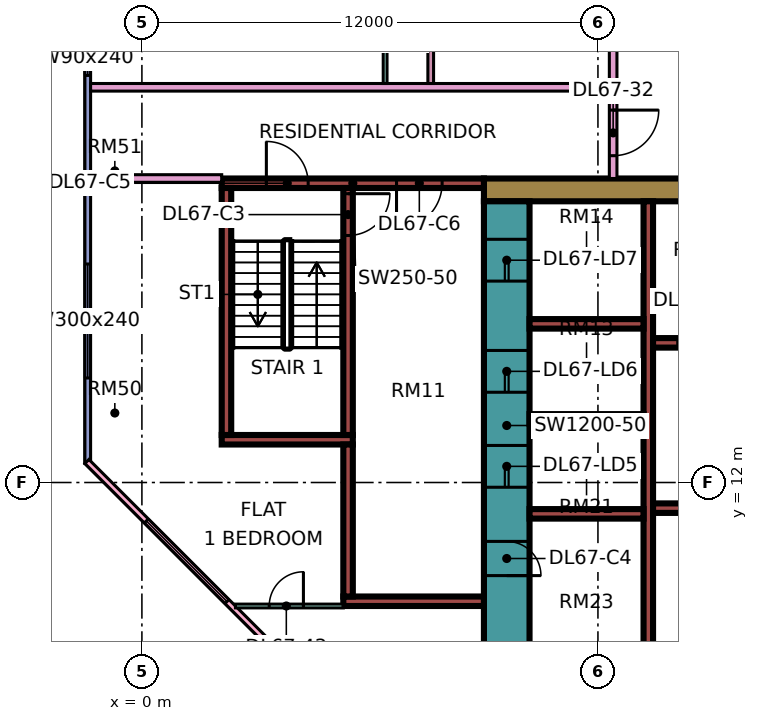
"""IFC4 building model, lengths in metres.
Left out: names, types, materials, properties, quantities, classifications, styles, units other than length and angle.
Written with IfcOpenShell. Run it as: python <this file> out.ifc"""

import sys

from ifc_helpers import new_model, si_unit, direction, frame, frame_2d, origin, place, context, subcontext, project, spatial, rectangle, extrude, element, fill, save


model = new_model("IFC4")
c1 = context("Model", 3, precision=1e-05, world=origin(), true_north=direction((0.0, 1.0)))
c2 = subcontext(c1, "Body", "Model", "MODEL_VIEW")
j1 = project(units=[si_unit("LENGTHUNIT", "METRE"), si_unit("PLANEANGLEUNIT", "RADIAN")], contexts=[c1])
p1 = place(None, origin())
s1 = spatial("IfcSite", under=j1, at=p1, CompositionType="ELEMENT")
p2 = place(p1, origin())
s2 = spatial("IfcBuilding", under=s1, at=p2, CompositionType="ELEMENT")
p3 = place(p2, frame((0.0, 0.0, 288.4)))
s3 = spatial("IfcBuildingStorey", under=s2, at=p3, CompositionType="ELEMENT", Elevation=288.4)
p4 = place(p3, frame((9.0, 19.7, 0.0), z_axis=(0.0, 0.0, 1.0), x_axis=(1.0, 0.0, 0.0)))
e1 = element("IfcWall", 1, at=p4, inside=s3, PredefinedType="SHEAR", context=c2, shape_type="SweptSolid", body=[
    extrude(rectangle(XDim=25.0, YDim=0.6, at=frame_2d((12.5, 0.0))), origin(), (0.0, 0.0, 1.0), 3.75),
])
p5 = place(p4, frame((19.1, 0.0, 0.0)))
e2 = element("IfcOpeningElement", 2, at=p5, cuts=e1, PredefinedType="OPENING", context=c2, shape_type="SweptSolid", body=[
    extrude(rectangle(XDim=1.8, YDim=2.4, at=frame_2d((0.9, 1.2))), frame((0.0, 0.31, 0.0), z_axis=(0.0, -1.0, 0.0), x_axis=(1.0, 0.0, 0.0)), (0.0, 0.0, 1.0), 0.62),
])
p6 = place(p3, frame((9.6, 7.6, 0.0), z_axis=(0.0, 0.0, 1.0), x_axis=(0.0, 1.0, 0.0)))
e3 = element("IfcWall", 3, at=p6, inside=s3, PredefinedType="SHEAR", context=c2, shape_type="SweptSolid", body=[
    extrude(rectangle(XDim=11.8, YDim=1.2, at=frame_2d((5.9, 0.0))), origin(), (0.0, 0.0, 1.0), 3.75),
])
p7 = place(p6, frame((4.275, 0.0, 0.0)))
e4 = element("IfcOpeningElement", 4, at=p7, cuts=e3, PredefinedType="OPENING", context=c2, shape_type="SweptSolid", body=[
    extrude(rectangle(XDim=1.1, YDim=2.2, at=frame_2d((0.55, 1.1))), frame((0.0, 0.61, 0.0), z_axis=(0.0, -1.0, 0.0), x_axis=(1.0, 0.0, 0.0)), (0.0, 0.0, 1.0), 1.22),
])
p8 = place(p6, frame((6.775, 0.0, 0.0)))
e5 = element("IfcOpeningElement", 5, at=p8, cuts=e3, PredefinedType="OPENING", context=c2, shape_type="SweptSolid", body=[
    extrude(rectangle(XDim=1.1, YDim=2.2, at=frame_2d((0.55, 1.1))), frame((0.0, 0.61, 0.0), z_axis=(0.0, -1.0, 0.0), x_axis=(1.0, 0.0, 0.0)), (0.0, 0.0, 1.0), 1.22),
])
p9 = place(p6, frame((9.7, 0.0, 0.0)))
e6 = element("IfcOpeningElement", 6, at=p9, cuts=e3, PredefinedType="OPENING", context=c2, shape_type="SweptSolid", body=[
    extrude(rectangle(XDim=1.1, YDim=2.2, at=frame_2d((0.55, 1.1))), frame((0.0, 0.61, 0.0), z_axis=(0.0, -1.0, 0.0), x_axis=(1.0, 0.0, 0.0)), (0.0, 0.0, 1.0), 1.22),
])
p10 = place(p6, frame((1.95, 0.0, 0.0)))
e7 = element("IfcOpeningElement", 7, at=p10, cuts=e3, PredefinedType="OPENING", context=c2, shape_type="SweptSolid", body=[
    extrude(rectangle(XDim=0.9, YDim=2.1, at=frame_2d((0.45, 1.05))), frame((0.0, 0.61, 0.0), z_axis=(0.0, -1.0, 0.0), x_axis=(1.0, 0.0, 0.0)), (0.0, 0.0, 1.0), 1.22),
])
p11 = place(p3, frame((13.325, 7.6, 0.0), z_axis=(0.0, 0.0, 1.0), x_axis=(0.0, 1.0, 0.0)))
e8 = element("IfcWall", 8, at=p11, inside=s3, PredefinedType="SHEAR", context=c2, shape_type="SweptSolid", body=[
    extrude(rectangle(XDim=11.8, YDim=0.25, at=frame_2d((5.9, 0.0))), origin(), (0.0, 0.0, 1.0), 3.75),
])
p12 = place(p3, frame((13.45, 11.325, 0.0), z_axis=(0.0, 0.0, 1.0), x_axis=(1.0, 0.0, 0.0)))
e9 = element("IfcWall", 9, at=p12, inside=s3, PredefinedType="SHEAR", context=c2, shape_type="SweptSolid", body=[
    extrude(rectangle(XDim=19.95, YDim=0.25, at=frame_2d((9.975, 0.0))), origin(), (0.0, 0.0, 1.0), 3.75),
])
p13 = place(p12, frame((2.8, 0.0, 0.0)))
e10 = element("IfcOpeningElement", 10, at=p13, cuts=e9, PredefinedType="OPENING", context=c2, shape_type="SweptSolid", body=[
    extrude(rectangle(XDim=0.9, YDim=2.1, at=frame_2d((0.45, 1.05))), frame((0.0, 0.135, 0.0), z_axis=(0.0, -1.0, 0.0), x_axis=(1.0, 0.0, 0.0)), (0.0, 0.0, 1.0), 0.27),
])
p14 = place(p12, frame((8.175, 0.0, 0.0)))
e11 = element("IfcOpeningElement", 11, at=p14, cuts=e9, PredefinedType="OPENING", context=c2, shape_type="SweptSolid", body=[
    extrude(rectangle(XDim=0.9, YDim=2.1, at=frame_2d((0.45, 1.05))), frame((0.0, 0.135, 0.0), z_axis=(0.0, -1.0, 0.0), x_axis=(1.0, 0.0, 0.0)), (0.0, 0.0, 1.0), 0.27),
])
p15 = place(p12, frame((13.175, 0.0, 0.0)))
e12 = element("IfcOpeningElement", 12, at=p15, cuts=e9, PredefinedType="OPENING", context=c2, shape_type="SweptSolid", body=[
    extrude(rectangle(XDim=0.9, YDim=2.1, at=frame_2d((0.45, 1.05))), frame((0.0, 0.135, 0.0), z_axis=(0.0, -1.0, 0.0), x_axis=(1.0, 0.0, 0.0)), (0.0, 0.0, 1.0), 0.27),
])
p16 = place(p12, frame((17.65, 0.0, 0.0)))
e13 = element("IfcOpeningElement", 13, at=p16, cuts=e9, PredefinedType="OPENING", context=c2, shape_type="SweptSolid", body=[
    extrude(rectangle(XDim=0.9, YDim=2.1, at=frame_2d((0.45, 1.05))), frame((0.0, 0.135, 0.0), z_axis=(0.0, -1.0, 0.0), x_axis=(1.0, 0.0, 0.0)), (0.0, 0.0, 1.0), 0.27),
])
p17 = place(p3, frame((13.45, 15.675, 0.0), z_axis=(0.0, 0.0, 1.0), x_axis=(1.0, 0.0, 0.0)))
e14 = element("IfcWall", 14, at=p17, inside=s3, PredefinedType="SHEAR", context=c2, shape_type="SweptSolid", body=[
    extrude(rectangle(XDim=13.75, YDim=0.25, at=frame_2d((6.875, 0.0))), origin(), (0.0, 0.0, 1.0), 3.75),
])
p18 = place(p17, frame((0.65, 0.0, 0.0)))
e15 = element("IfcOpeningElement", 15, at=p18, cuts=e14, PredefinedType="OPENING", context=c2, shape_type="SweptSolid", body=[
    extrude(rectangle(XDim=1.2, YDim=2.2, at=frame_2d((0.6, 1.1))), frame((0.0, 0.135, 0.0), z_axis=(0.0, -1.0, 0.0), x_axis=(1.0, 0.0, 0.0)), (0.0, 0.0, 1.0), 0.27),
])
p19 = place(p17, frame((3.4, 0.0, 0.0)))
e16 = element("IfcOpeningElement", 16, at=p19, cuts=e14, PredefinedType="OPENING", context=c2, shape_type="SweptSolid", body=[
    extrude(rectangle(XDim=1.2, YDim=2.2, at=frame_2d((0.6, 1.1))), frame((0.0, 0.135, 0.0), z_axis=(0.0, -1.0, 0.0), x_axis=(1.0, 0.0, 0.0)), (0.0, 0.0, 1.0), 0.27),
])
p20 = place(p17, frame((6.15, 0.0, 0.0)))
e17 = element("IfcOpeningElement", 17, at=p20, cuts=e14, PredefinedType="OPENING", context=c2, shape_type="SweptSolid", body=[
    extrude(rectangle(XDim=1.2, YDim=2.2, at=frame_2d((0.6, 1.1))), frame((0.0, 0.135, 0.0), z_axis=(0.0, -1.0, 0.0), x_axis=(1.0, 0.0, 0.0)), (0.0, 0.0, 1.0), 0.27),
])
p21 = place(p17, frame((8.9, 0.0, 0.0)))
e18 = element("IfcOpeningElement", 18, at=p21, cuts=e14, PredefinedType="OPENING", context=c2, shape_type="SweptSolid", body=[
    extrude(rectangle(XDim=1.2, YDim=2.2, at=frame_2d((0.6, 1.1))), frame((0.0, 0.135, 0.0), z_axis=(0.0, -1.0, 0.0), x_axis=(1.0, 0.0, 0.0)), (0.0, 0.0, 1.0), 0.27),
])
p22 = place(p17, frame((11.8, 0.0, 0.0)))
e19 = element("IfcOpeningElement", 19, at=p22, cuts=e14, PredefinedType="OPENING", context=c2, shape_type="SweptSolid", body=[
    extrude(rectangle(XDim=0.9, YDim=2.1, at=frame_2d((0.45, 1.05))), frame((0.0, 0.135, 0.0), z_axis=(0.0, -1.0, 0.0), x_axis=(1.0, 0.0, 0.0)), (0.0, 0.0, 1.0), 0.27),
])
for number, where, z_axis, x_axis in (
    (20, (10.2, 11.175, 0.0), (0.0, 0.0, 1.0), (1.0, 0.0, 0.0)),
    (21, (10.2, 13.675, 0.0), (0.0, 0.0, 1.0), (1.0, 0.0, 0.0)),
    (22, (10.2, 16.175, 0.0), (0.0, 0.0, 1.0), (1.0, 0.0, 0.0)),
):
    element("IfcWall", number, at=place(p3, frame(where, z_axis=z_axis, x_axis=x_axis)), inside=s3, PredefinedType="SHEAR", context=c2, shape_type="SweptSolid", body=[
        extrude(rectangle(XDim=3.0, YDim=0.25, at=frame_2d((1.5, 0.0))), origin(), (0.0, 0.0, 1.0), 3.75),
    ])
p23 = place(p3, frame((2.1, 19.875, 0.0), z_axis=(0.0, 0.0, 1.0), x_axis=(1.0, 0.0, 0.0)))
e23 = element("IfcWall", 23, at=p23, inside=s3, PredefinedType="SHEAR", context=c2, shape_type="SweptSolid", body=[
    extrude(rectangle(XDim=6.9, YDim=0.25, at=frame_2d((3.45, 0.0))), origin(), (0.0, 0.0, 1.0), 3.75),
])
p24 = place(p23, frame((1.175, 0.0, 0.0)))
e24 = element("IfcOpeningElement", 24, at=p24, cuts=e23, PredefinedType="OPENING", context=c2, shape_type="SweptSolid", body=[
    extrude(rectangle(XDim=1.1, YDim=2.2, at=frame_2d((0.55, 1.1))), frame((0.0, 0.135, 0.0), z_axis=(0.0, -1.0, 0.0), x_axis=(1.0, 0.0, 0.0)), (0.0, 0.0, 1.0), 0.27),
])
p25 = place(p23, frame((4.6, 0.0, 0.0)))
e25 = element("IfcOpeningElement", 25, at=p25, cuts=e23, PredefinedType="OPENING", context=c2, shape_type="SweptSolid", body=[
    extrude(rectangle(XDim=1.2, YDim=2.2, at=frame_2d((0.6, 1.1))), frame((0.0, 0.135, 0.0), z_axis=(0.0, -1.0, 0.0), x_axis=(1.0, 0.0, 0.0)), (0.0, 0.0, 1.0), 0.27),
])
p26 = place(p3, frame((2.1, 13.125, 0.0), z_axis=(0.0, 0.0, 1.0), x_axis=(1.0, 0.0, 0.0)))
e26 = element("IfcWall", 26, at=p26, inside=s3, PredefinedType="SHEAR", context=c2, shape_type="SweptSolid", body=[
    extrude(rectangle(XDim=3.45, YDim=0.25, at=frame_2d((1.725, 0.0))), origin(), (0.0, 0.0, 1.0), 3.75),
])
p27 = place(p3, frame((2.225, 13.25, 0.0), z_axis=(0.0, 0.0, 1.0), x_axis=(0.0, 1.0, 0.0)))
e27 = element("IfcWall", 27, at=p27, inside=s3, PredefinedType="SHEAR", context=c2, shape_type="SweptSolid", body=[
    extrude(rectangle(XDim=6.5, YDim=0.25, at=frame_2d((3.25, 0.0))), origin(), (0.0, 0.0, 1.0), 3.75),
])
p28 = place(p3, frame((5.425, 13.25, 0.0), z_axis=(0.0, 0.0, 1.0), x_axis=(0.0, 1.0, 0.0)))
e28 = element("IfcWall", 28, at=p28, inside=s3, PredefinedType="SHEAR", context=c2, shape_type="SweptSolid", body=[
    extrude(rectangle(XDim=6.5, YDim=0.25, at=frame_2d((3.25, 0.0))), origin(), (0.0, 0.0, 1.0), 3.75),
])
p29 = place(p28, frame((5.25, 0.0, 0.0)))
e29 = element("IfcOpeningElement", 29, at=p29, cuts=e28, PredefinedType="OPENING", context=c2, shape_type="SweptSolid", body=[
    extrude(rectangle(XDim=1.1, YDim=2.2, at=frame_2d((0.55, 1.1))), frame((0.0, 0.135, 0.0), z_axis=(0.0, -1.0, 0.0), x_axis=(1.0, 0.0, 0.0)), (0.0, 0.0, 1.0), 0.27),
])
p30 = place(p3, frame((5.3, 8.875, 0.0), z_axis=(0.0, 0.0, 1.0), x_axis=(1.0, 0.0, 0.0)))
e30 = element("IfcWall", 30, at=p30, inside=s3, PredefinedType="SHEAR", context=c2, shape_type="SweptSolid", body=[
    extrude(rectangle(XDim=3.7, YDim=0.25, at=frame_2d((1.85, 0.0))), origin(), (0.0, 0.0, 1.0), 3.75),
])
p31 = place(p3, frame((5.425, 9.0, 0.0), z_axis=(0.0, 0.0, 1.0), x_axis=(0.0, 1.0, 0.0)))
e31 = element("IfcWall", 31, at=p31, inside=s3, PredefinedType="SHEAR", context=c2, shape_type="SweptSolid", body=[
    extrude(rectangle(XDim=4.0, YDim=0.25, at=frame_2d((2.0, 0.0))), origin(), (0.0, 0.0, 1.0), 3.75),
])
p32 = place(p3, frame((-1.425, 23.925, 0.0), z_axis=(0.0, 0.0, 1.0), x_axis=(0.0, -1.0, 0.0)))
e32 = element("IfcWall", 32, at=p32, inside=s3, PredefinedType="SOLIDWALL", context=c2, shape_type="SweptSolid", body=[
    extrude(rectangle(XDim=11.425, YDim=0.15, at=frame_2d((5.712, 0.0))), origin(), (0.0, 0.0, 1.0), 3.35),
])
p33 = place(p32, frame((0.312, 0.0, 0.45)))
e33 = element("IfcOpeningElement", 33, at=p33, cuts=e32, PredefinedType="OPENING", context=c2, shape_type="SweptSolid", body=[
    extrude(rectangle(XDim=0.9, YDim=2.4, at=frame_2d((0.45, 1.2))), frame((0.0, 0.085, 0.0), z_axis=(0.0, -1.0, 0.0), x_axis=(1.0, 0.0, 0.0)), (0.0, 0.0, 1.0), 0.17),
])
p34 = place(p32, frame((6.175, 0.0, 0.45)))
e34 = element("IfcOpeningElement", 34, at=p34, cuts=e32, PredefinedType="OPENING", context=c2, shape_type="SweptSolid", body=[
    extrude(rectangle(XDim=3.0, YDim=2.4, at=frame_2d((1.5, 1.2))), frame((0.0, 0.085, 0.0), z_axis=(0.0, -1.0, 0.0), x_axis=(1.0, 0.0, 0.0)), (0.0, 0.0, 1.0), 0.17),
])
p35 = place(p3, frame((-1.447, 12.553, 0.0), z_axis=(0.0, 0.0, 1.0), x_axis=(0.707106781187, -0.707106781187, 0.0)))
e35 = element("IfcWall", 35, at=p35, inside=s3, PredefinedType="SOLIDWALL", context=c2, shape_type="SweptSolid", body=[
    extrude(rectangle(XDim=19.799, YDim=0.15, at=frame_2d((9.899, 0.0))), origin(), (0.0, 0.0, 1.0), 3.35),
])
p36 = place(p35, frame((2.212, 0.0, 0.45)))
e36 = element("IfcOpeningElement", 36, at=p36, cuts=e35, PredefinedType="OPENING", context=c2, shape_type="SweptSolid", body=[
    extrude(rectangle(XDim=3.0, YDim=2.4, at=frame_2d((1.5, 1.2))), frame((0.0, 0.085, 0.0), z_axis=(0.0, -1.0, 0.0), x_axis=(1.0, 0.0, 0.0)), (0.0, 0.0, 1.0), 0.17),
])
p37 = place(p35, frame((10.216, 0.0, 0.45)))
e37 = element("IfcOpeningElement", 37, at=p37, cuts=e35, PredefinedType="OPENING", context=c2, shape_type="SweptSolid", body=[
    extrude(rectangle(XDim=3.0, YDim=2.4, at=frame_2d((1.5, 1.2))), frame((0.0, 0.085, 0.0), z_axis=(0.0, -1.0, 0.0), x_axis=(1.0, 0.0, 0.0)), (0.0, 0.0, 1.0), 0.17),
])
p38 = place(p3, frame((-1.35, 20.0, 0.0), z_axis=(0.0, 0.0, 1.0), x_axis=(1.0, 0.0, 0.0)))
e38 = element("IfcWall", 38, at=p38, inside=s3, PredefinedType="PARTITIONING", context=c2, shape_type="SweptSolid", body=[
    extrude(rectangle(XDim=3.45, YDim=0.2, at=frame_2d((1.725, 0.0))), origin(), (0.0, 0.0, 1.0), 3.35),
])
p39 = place(p3, frame((-1.35, 22.4, 0.0), z_axis=(0.0, 0.0, 1.0), x_axis=(1.0, 0.0, 0.0)))
e39 = element("IfcWall", 39, at=p39, inside=s3, PredefinedType="PARTITIONING", context=c2, shape_type="SweptSolid", body=[
    extrude(rectangle(XDim=13.65, YDim=0.2, at=frame_2d((6.825, 0.0))), origin(), (0.0, 0.0, 1.0), 3.35),
])
p40 = place(p3, frame((2.461, 8.75, 0.0), z_axis=(0.0, 0.0, 1.0), x_axis=(1.0, 0.0, 0.0)))
e40 = element("IfcWall", 40, at=p40, inside=s3, PredefinedType="PARTITIONING", context=c2, shape_type="SweptSolid", body=[
    extrude(rectangle(XDim=2.839, YDim=0.1, at=frame_2d((1.419, 0.0))), origin(), (0.0, 0.0, 1.0), 3.35),
])
p41 = place(p40, frame((0.889, 0.0, 0.0)))
e41 = element("IfcOpeningElement", 41, at=p41, cuts=e40, PredefinedType="OPENING", context=c2, shape_type="SweptSolid", body=[
    extrude(rectangle(XDim=0.9, YDim=2.1, at=frame_2d((0.45, 1.05))), frame((0.0, 0.06, 0.0), z_axis=(0.0, -1.0, 0.0), x_axis=(1.0, 0.0, 0.0)), (0.0, 0.0, 1.0), 0.12),
])
p42 = place(p3, frame((6.4, 22.5, 0.0), z_axis=(0.0, 0.0, 1.0), x_axis=(0.0, 1.0, 0.0)))
e42 = element("IfcWall", 42, at=p42, inside=s3, PredefinedType="PARTITIONING", context=c2, shape_type="SweptSolid", body=[
    extrude(rectangle(XDim=4.45, YDim=0.1, at=frame_2d((2.225, 0.0))), origin(), (0.0, 0.0, 1.0), 3.35),
])
p43 = place(p42, frame((1.8, 0.0, 0.0)))
e43 = element("IfcOpeningElement", 43, at=p43, cuts=e42, PredefinedType="OPENING", context=c2, shape_type="SweptSolid", body=[
    extrude(rectangle(XDim=0.9, YDim=2.1, at=frame_2d((0.45, 1.05))), frame((0.0, 0.06, 0.0), z_axis=(0.0, -1.0, 0.0), x_axis=(1.0, 0.0, 0.0)), (0.0, 0.0, 1.0), 0.12),
])
p44 = place(p3, frame((7.6, 22.5, 0.0), z_axis=(0.0, 0.0, 1.0), x_axis=(0.0, 1.0, 0.0)))
e44 = element("IfcWall", 44, at=p44, inside=s3, PredefinedType="PARTITIONING", context=c2, shape_type="SweptSolid", body=[
    extrude(rectangle(XDim=10.275, YDim=0.15, at=frame_2d((5.137, 0.0))), origin(), (0.0, 0.0, 1.0), 3.35),
])
p45 = place(p44, frame((8.7, 0.0, 0.0)))
e45 = element("IfcOpeningElement", 45, at=p45, cuts=e44, PredefinedType="OPENING", context=c2, shape_type="SweptSolid", body=[
    extrude(rectangle(XDim=0.8, YDim=2.1, at=frame_2d((0.4, 1.05))), frame((0.0, 0.085, 0.0), z_axis=(0.0, -1.0, 0.0), x_axis=(1.0, 0.0, 0.0)), (0.0, 0.0, 1.0), 0.17),
])
p46 = place(p44, frame((3.5, 0.0, 0.0)))
e46 = element("IfcOpeningElement", 46, at=p46, cuts=e44, PredefinedType="OPENING", context=c2, shape_type="SweptSolid", body=[
    extrude(rectangle(XDim=0.9, YDim=2.1, at=frame_2d((0.45, 1.05))), frame((0.0, 0.085, 0.0), z_axis=(0.0, -1.0, 0.0), x_axis=(1.0, 0.0, 0.0)), (0.0, 0.0, 1.0), 0.17),
])
p47 = place(p3, frame((12.4, 20.0, 0.0), z_axis=(0.0, 0.0, 1.0), x_axis=(0.0, 1.0, 0.0)))
e47 = element("IfcWall", 47, at=p47, inside=s3, PredefinedType="PARTITIONING", context=c2, shape_type="SweptSolid", body=[
    extrude(rectangle(XDim=34.0, YDim=0.2, at=frame_2d((17.0, 0.0))), origin(), (0.0, 0.0, 1.0), 3.35),
])
p48 = place(p47, frame((31.95, 0.0, 0.0)))
e48 = element("IfcOpeningElement", 48, at=p48, cuts=e47, PredefinedType="OPENING", context=c2, shape_type="SweptSolid", body=[
    extrude(rectangle(XDim=1.0, YDim=2.1, at=frame_2d((0.5, 1.05))), frame((0.0, 0.11, 0.0), z_axis=(0.0, -1.0, 0.0), x_axis=(1.0, 0.0, 0.0)), (0.0, 0.0, 1.0), 0.22),
])
p49 = place(p47, frame((0.6, 0.0, 0.0)))
e49 = element("IfcOpeningElement", 49, at=p49, cuts=e47, PredefinedType="OPENING", context=c2, shape_type="SweptSolid", body=[
    extrude(rectangle(XDim=1.2, YDim=2.1, at=frame_2d((0.6, 1.05))), frame((0.0, 0.11, 0.0), z_axis=(0.0, -1.0, 0.0), x_axis=(1.0, 0.0, 0.0)), (0.0, 0.0, 1.0), 0.22),
])
p50 = place(p47, frame((13.8, 0.0, 0.0)))
e50 = element("IfcOpeningElement", 50, at=p50, cuts=e47, PredefinedType="OPENING", context=c2, shape_type="SweptSolid", body=[
    extrude(rectangle(XDim=1.0, YDim=2.1, at=frame_2d((0.5, 1.05))), frame((0.0, 0.11, 0.0), z_axis=(0.0, -1.0, 0.0), x_axis=(1.0, 0.0, 0.0)), (0.0, 0.0, 1.0), 0.22),
])
p51 = place(p33, origin())
e51 = element("IfcWindow", 51, at=p51, inside=s3, PartitioningType="SINGLE_PANEL", PredefinedType="WINDOW", context=c2, shape_type="SweptSolid", body=[
    extrude(rectangle(XDim=0.9, YDim=2.4, at=frame_2d((0.45, 1.2))), frame((0.0, 0.03, 0.0), z_axis=(0.0, -1.0, 0.0), x_axis=(1.0, 0.0, 0.0)), (0.0, 0.0, 1.0), 0.06),
])
fill(e33, e51)
p52 = place(p34, origin())
e52 = element("IfcWindow", 52, at=p52, inside=s3, PartitioningType="SINGLE_PANEL", PredefinedType="WINDOW", context=c2, shape_type="SweptSolid", body=[
    extrude(rectangle(XDim=3.0, YDim=2.4, at=frame_2d((1.5, 1.2))), frame((0.0, 0.03, 0.0), z_axis=(0.0, -1.0, 0.0), x_axis=(1.0, 0.0, 0.0)), (0.0, 0.0, 1.0), 0.06),
])
fill(e34, e52)
p53 = place(p36, origin())
e53 = element("IfcWindow", 53, at=p53, inside=s3, PartitioningType="SINGLE_PANEL", PredefinedType="WINDOW", context=c2, shape_type="SweptSolid", body=[
    extrude(rectangle(XDim=3.0, YDim=2.4, at=frame_2d((1.5, 1.2))), frame((0.0, 0.03, 0.0), z_axis=(0.0, -1.0, 0.0), x_axis=(1.0, 0.0, 0.0)), (0.0, 0.0, 1.0), 0.06),
])
fill(e36, e53)
p54 = place(p18, origin())
e54 = element("IfcDoor", 54, at=p54, inside=s3, OperationType="DOUBLE_DOOR_SLIDING", PredefinedType="DOOR", context=c2, shape_type="SweptSolid", body=[
    extrude(rectangle(XDim=1.2, YDim=2.2, at=frame_2d((0.6, 1.1))), frame((0.0, 0.025, 0.0), z_axis=(0.0, -1.0, 0.0), x_axis=(1.0, 0.0, 0.0)), (0.0, 0.0, 1.0), 0.05),
])
fill(e15, e54)
p55 = place(p7, origin())
e55 = element("IfcDoor", 55, at=p55, inside=s3, OperationType="DOUBLE_DOOR_SLIDING", PredefinedType="DOOR", context=c2, shape_type="SweptSolid", body=[
    extrude(rectangle(XDim=1.1, YDim=2.2, at=frame_2d((0.55, 1.1))), frame((0.0, 0.025, 0.0), z_axis=(0.0, -1.0, 0.0), x_axis=(1.0, 0.0, 0.0)), (0.0, 0.0, 1.0), 0.05),
])
fill(e4, e55)
p56 = place(p8, origin())
e56 = element("IfcDoor", 56, at=p56, inside=s3, OperationType="DOUBLE_DOOR_SLIDING", PredefinedType="DOOR", context=c2, shape_type="SweptSolid", body=[
    extrude(rectangle(XDim=1.1, YDim=2.2, at=frame_2d((0.55, 1.1))), frame((0.0, 0.025, 0.0), z_axis=(0.0, -1.0, 0.0), x_axis=(1.0, 0.0, 0.0)), (0.0, 0.0, 1.0), 0.05),
])
fill(e5, e56)
p57 = place(p9, origin())
e57 = element("IfcDoor", 57, at=p57, inside=s3, OperationType="DOUBLE_DOOR_SLIDING", PredefinedType="DOOR", context=c2, shape_type="SweptSolid", body=[
    extrude(rectangle(XDim=1.1, YDim=2.2, at=frame_2d((0.55, 1.1))), frame((0.0, 0.025, 0.0), z_axis=(0.0, -1.0, 0.0), x_axis=(1.0, 0.0, 0.0)), (0.0, 0.0, 1.0), 0.05),
])
fill(e6, e57)
p58 = place(p29, origin())
e58 = element("IfcDoor", 58, at=p58, inside=s3, OperationType="SINGLE_SWING_RIGHT", PredefinedType="DOOR", context=c2, shape_type="SweptSolid", body=[
    extrude(rectangle(XDim=1.1, YDim=2.2, at=frame_2d((0.55, 1.1))), frame((0.0, 0.025, 0.0), z_axis=(0.0, -1.0, 0.0), x_axis=(1.0, 0.0, 0.0)), (0.0, 0.0, 1.0), 0.05),
])
fill(e29, e58)
p59 = place(p10, frame((0.9, 0.0, 0.0), z_axis=(0.0, 0.0, 1.0), x_axis=(-1.0, 0.0, 0.0)))
e59 = element("IfcDoor", 59, at=p59, inside=s3, OperationType="SINGLE_SWING_LEFT", PredefinedType="DOOR", context=c2, shape_type="SweptSolid", body=[
    extrude(rectangle(XDim=0.9, YDim=2.1, at=frame_2d((0.45, 1.05))), frame((0.0, 0.025, 0.0), z_axis=(0.0, -1.0, 0.0), x_axis=(1.0, 0.0, 0.0)), (0.0, 0.0, 1.0), 0.05),
])
fill(e7, e59)
p60 = place(p24, origin())
e60 = element("IfcDoor", 60, at=p60, inside=s3, OperationType="SINGLE_SWING_LEFT", PredefinedType="DOOR", context=c2, shape_type="SweptSolid", body=[
    extrude(rectangle(XDim=1.1, YDim=2.2, at=frame_2d((0.55, 1.1))), frame((0.0, 0.025, 0.0), z_axis=(0.0, -1.0, 0.0), x_axis=(1.0, 0.0, 0.0)), (0.0, 0.0, 1.0), 0.05),
])
fill(e24, e60)
p61 = place(p25, frame((1.2, 0.0, 0.0), z_axis=(0.0, 0.0, 1.0), x_axis=(-1.0, 0.0, 0.0)))
e61 = element("IfcDoor", 61, at=p61, inside=s3, OperationType="SINGLE_SWING_LEFT", PredefinedType="DOOR", context=c2, shape_type="SweptSolid", body=[
    extrude(rectangle(XDim=1.2, YDim=2.2, at=frame_2d((0.6, 1.1))), frame((0.0, 0.025, 0.0), z_axis=(0.0, -1.0, 0.0), x_axis=(1.0, 0.0, 0.0)), (0.0, 0.0, 1.0), 0.05),
])
fill(e25, e61)
p62 = place(p49, origin())
e62 = element("IfcDoor", 62, at=p62, inside=s3, OperationType="SINGLE_SWING_RIGHT", PredefinedType="DOOR", context=c2, shape_type="SweptSolid", body=[
    extrude(rectangle(XDim=1.2, YDim=2.1, at=frame_2d((0.6, 1.05))), frame((0.0, 0.025, 0.0), z_axis=(0.0, -1.0, 0.0), x_axis=(1.0, 0.0, 0.0)), (0.0, 0.0, 1.0), 0.05),
])
fill(e49, e62)
p63 = place(p41, frame((0.9, 0.0, 0.0), z_axis=(0.0, 0.0, 1.0), x_axis=(-1.0, 0.0, 0.0)))
e63 = element("IfcDoor", 63, at=p63, inside=s3, OperationType="SINGLE_SWING_RIGHT", PredefinedType="DOOR", context=c2, shape_type="SweptSolid", body=[
    extrude(rectangle(XDim=0.9, YDim=2.1, at=frame_2d((0.45, 1.05))), frame((0.0, 0.025, 0.0), z_axis=(0.0, -1.0, 0.0), x_axis=(1.0, 0.0, 0.0)), (0.0, 0.0, 1.0), 0.05),
])
fill(e41, e63)
save(model, sys.argv[1])
